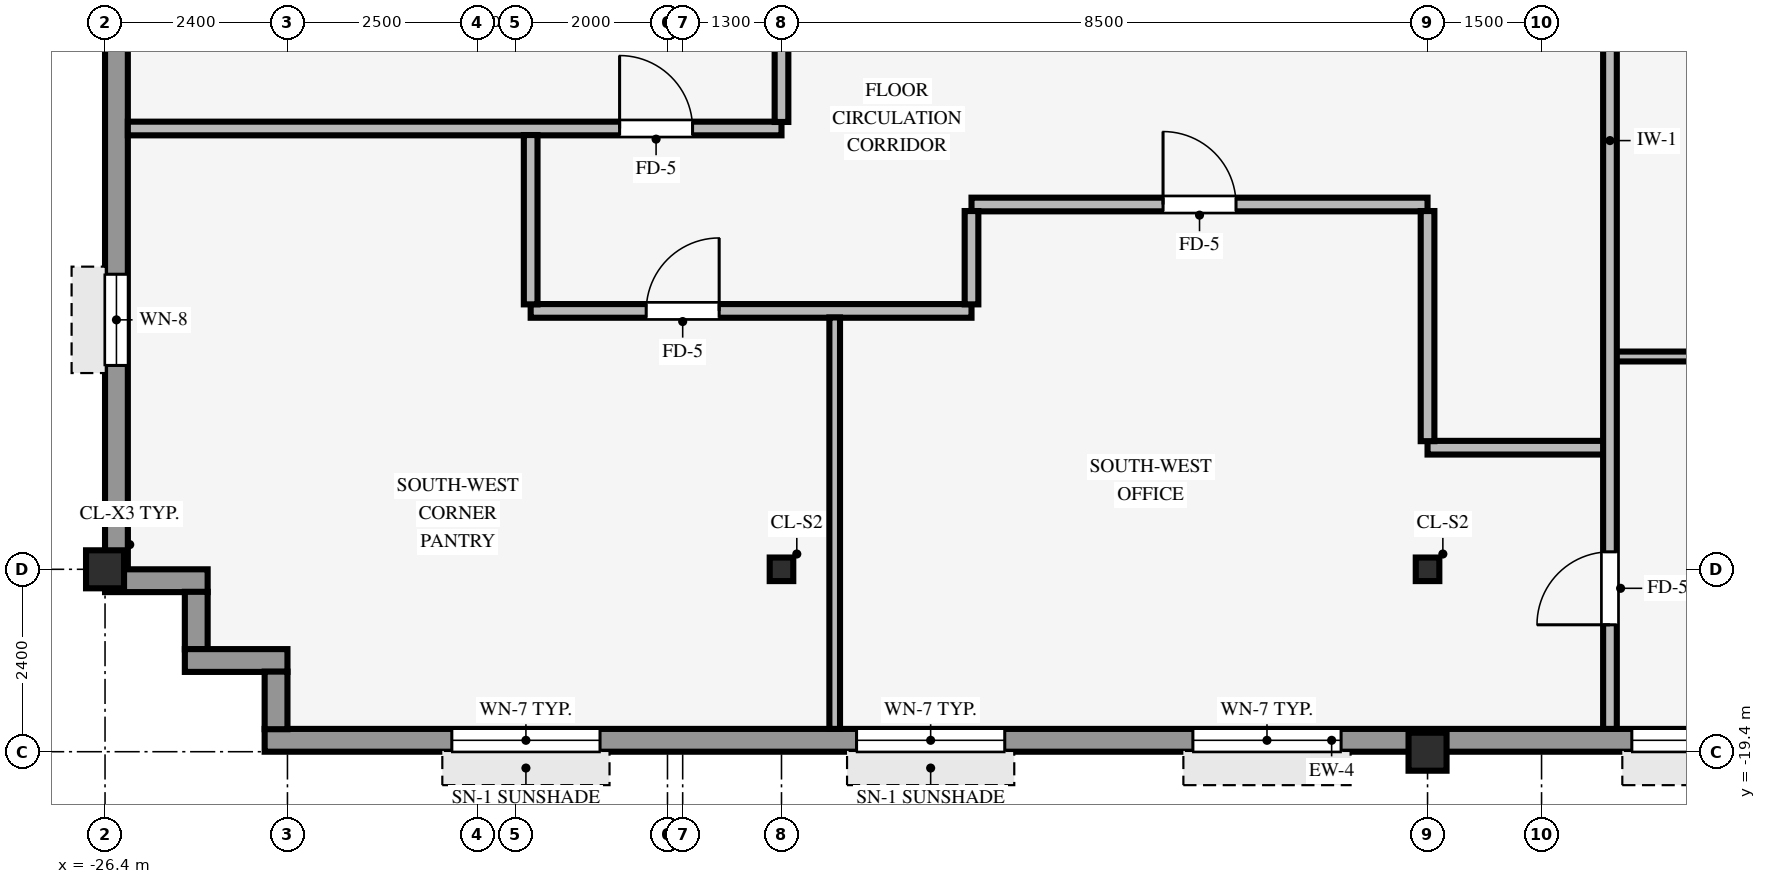
"""IFC4 building model, lengths in metres.
Left out: names, types, materials, properties, quantities, classifications, styles, units other than length and angle.
Written with IfcOpenShell. Run it as: python <this file> out.ifc"""

import sys

from ifc_helpers import new_model, si_unit, direction, frame, frame_2d, origin, origin_2d, place, context, subcontext, project, spatial, rectangle, hollow_rectangle, i_section, extrude, source, transform, mapped, element, fill, save


model = new_model("IFC4")
c1 = context("Model", 3, precision=1e-05, world=origin(), true_north=direction((0.0, 1.0)))
c2 = subcontext(c1, "Body", "Model", "MODEL_VIEW")
j1 = project(units=[si_unit("LENGTHUNIT", "METRE"), si_unit("PLANEANGLEUNIT", "RADIAN")], contexts=[c1])
p1 = place(None, origin())
s1 = spatial("IfcSite", under=j1, at=p1, CompositionType="ELEMENT")
p2 = place(p1, origin())
s2 = spatial("IfcBuilding", under=s1, at=p2, CompositionType="ELEMENT")
p3 = place(p2, frame((0.0, 0.0, 234.7)))
s3 = spatial("IfcBuildingStorey", under=s2, at=p3, CompositionType="ELEMENT", Elevation=234.7)
for number, where, z_axis, x_axis in (
    (1, (-26.4, -17.0, 0.0), (0.0, 0.0, 1.0), (1.0, 0.0, 0.0)),
    (2, (-9.0, -19.4, 0.0), (0.0, 0.0, 1.0), (1.0, 0.0, 0.0)),
):
    element("IfcColumn", number, at=place(p3, frame(where, z_axis=z_axis, x_axis=x_axis)), inside=s3, PredefinedType="COLUMN", context=c2, shape_type="SweptSolid", body=[
        extrude(hollow_rectangle(XDim=0.5, YDim=0.5, WallThickness=0.032, InnerFilletRadius=0.032, OuterFilletRadius=0.064, at=origin_2d()), origin(), (0.0, 0.0, 1.0), 3.37),
    ])
for number, where, z_axis, x_axis in (
    (3, (-17.5, -17.0, 0.0), (0.0, 0.0, 1.0), (1.0, 0.0, 0.0)),
    (4, (-9.0, -17.0, 0.0), (0.0, 0.0, 1.0), (1.0, 0.0, 0.0)),
):
    element("IfcColumn", number, at=place(p3, frame(where, z_axis=z_axis, x_axis=x_axis)), inside=s3, PredefinedType="COLUMN", context=c2, shape_type="SweptSolid", body=[
        extrude(i_section(OverallWidth=0.31, OverallDepth=0.31, WebThickness=0.015, FlangeThickness=0.015, FilletRadius=0.015, at=origin_2d()), origin(), (0.0, 0.0, 1.0), 3.37),
    ])
p4 = place(p3, frame((-24.3, -19.25, 0.0), z_axis=(0.0, 0.0, 1.0), x_axis=(1.0, 0.0, 0.0)))
e5 = element("IfcWall", 5, at=p4, inside=s3, PredefinedType="STANDARD", context=c2, shape_type="SweptSolid", body=[
    extrude(rectangle(XDim=41.0, YDim=0.3, at=frame_2d((20.5, 0.0))), origin(), (0.0, 0.0, 1.0), 2.705),
])
p5 = place(p4, frame((29.55, 0.0, 0.0), z_axis=(0.0, 0.0, 1.0), x_axis=(-1.0, 0.0, 0.0)))
e6 = element("IfcOpeningElement", 6, at=p5, cuts=e5, PredefinedType="OPENING", context=c2, shape_type="SweptSolid", body=[
    extrude(rectangle(XDim=1.05, YDim=2.1, at=frame_2d((0.525, 1.05))), frame((0.0, 0.16, 0.0), z_axis=(0.0, -1.0, 0.0), x_axis=(1.0, 0.0, 0.0)), (0.0, 0.0, 1.0), 0.32),
])
p6 = place(p4, frame((2.462, 0.0, 0.8)))
e7 = element("IfcOpeningElement", 7, at=p6, cuts=e5, PredefinedType="OPENING", context=c2, shape_type="SweptSolid", body=[
    extrude(rectangle(XDim=1.95, YDim=1.48, at=frame_2d((0.975, 0.74))), frame((0.0, 0.16, 0.0), z_axis=(0.0, -1.0, 0.0), x_axis=(1.0, 0.0, 0.0)), (0.0, 0.0, 1.0), 0.32),
])
p7 = place(p4, frame((7.788, 0.0, 0.8)))
e8 = element("IfcOpeningElement", 8, at=p7, cuts=e5, PredefinedType="OPENING", context=c2, shape_type="SweptSolid", body=[
    extrude(rectangle(XDim=1.95, YDim=1.48, at=frame_2d((0.975, 0.74))), frame((0.0, 0.16, 0.0), z_axis=(0.0, -1.0, 0.0), x_axis=(1.0, 0.0, 0.0)), (0.0, 0.0, 1.0), 0.32),
])
p8 = place(p4, frame((12.212, 0.0, 0.8)))
e9 = element("IfcOpeningElement", 9, at=p8, cuts=e5, PredefinedType="OPENING", context=c2, shape_type="SweptSolid", body=[
    extrude(rectangle(XDim=1.95, YDim=1.48, at=frame_2d((0.975, 0.74))), frame((0.0, 0.16, 0.0), z_axis=(0.0, -1.0, 0.0), x_axis=(1.0, 0.0, 0.0)), (0.0, 0.0, 1.0), 0.32),
])
p9 = place(p4, frame((17.988, 0.0, 0.8)))
e10 = element("IfcOpeningElement", 10, at=p9, cuts=e5, PredefinedType="OPENING", context=c2, shape_type="SweptSolid", body=[
    extrude(rectangle(XDim=1.95, YDim=1.48, at=frame_2d((0.975, 0.74))), frame((0.0, 0.16, 0.0), z_axis=(0.0, -1.0, 0.0), x_axis=(1.0, 0.0, 0.0)), (0.0, 0.0, 1.0), 0.32),
])
p10 = place(p4, frame((21.512, 0.0, 0.8)))
e11 = element("IfcOpeningElement", 11, at=p10, cuts=e5, PredefinedType="OPENING", context=c2, shape_type="SweptSolid", body=[
    extrude(rectangle(XDim=1.95, YDim=1.48, at=frame_2d((0.975, 0.74))), frame((0.0, 0.16, 0.0), z_axis=(0.0, -1.0, 0.0), x_axis=(1.0, 0.0, 0.0)), (0.0, 0.0, 1.0), 0.32),
])
p11 = place(p4, frame((25.938, 0.0, 0.8)))
e12 = element("IfcOpeningElement", 12, at=p11, cuts=e5, PredefinedType="OPENING", context=c2, shape_type="SweptSolid", body=[
    extrude(rectangle(XDim=1.95, YDim=1.48, at=frame_2d((0.975, 0.74))), frame((0.0, 0.16, 0.0), z_axis=(0.0, -1.0, 0.0), x_axis=(1.0, 0.0, 0.0)), (0.0, 0.0, 1.0), 0.32),
])
p12 = place(p4, frame((36.587, 0.0, 0.8)))
e13 = element("IfcOpeningElement", 13, at=p12, cuts=e5, PredefinedType="OPENING", context=c2, shape_type="SweptSolid", body=[
    extrude(rectangle(XDim=1.95, YDim=1.48, at=frame_2d((0.975, 0.74))), frame((0.0, 0.16, 0.0), z_axis=(0.0, -1.0, 0.0), x_axis=(1.0, 0.0, 0.0)), (0.0, 0.0, 1.0), 0.32),
])
p13 = place(p3, frame((-26.25, -17.004, 0.0), z_axis=(0.0, 0.0, 1.0), x_axis=(0.0, 1.0, 0.0)))
e14 = element("IfcWall", 14, at=p13, inside=s3, PredefinedType="STANDARD", context=c2, shape_type="SweptSolid", body=[
    extrude(rectangle(XDim=34.008, YDim=0.3, at=frame_2d((17.004, 0.0))), origin(), (0.0, 0.0, 1.0), 2.705),
])
p14 = place(p13, frame((2.686, 0.0, 0.8)))
e15 = element("IfcOpeningElement", 15, at=p14, cuts=e14, PredefinedType="OPENING", context=c2, shape_type="SweptSolid", body=[
    extrude(rectangle(XDim=1.2, YDim=1.48, at=frame_2d((0.6, 0.74))), frame((0.0, 0.16, 0.0), z_axis=(0.0, -1.0, 0.0), x_axis=(1.0, 0.0, 0.0)), (0.0, 0.0, 1.0), 0.32),
])
p15 = place(p13, frame((8.159, 0.0, 0.8)))
e16 = element("IfcOpeningElement", 16, at=p15, cuts=e14, PredefinedType="OPENING", context=c2, shape_type="SweptSolid", body=[
    extrude(rectangle(XDim=1.2, YDim=1.48, at=frame_2d((0.6, 0.74))), frame((0.0, 0.16, 0.0), z_axis=(0.0, -1.0, 0.0), x_axis=(1.0, 0.0, 0.0)), (0.0, 0.0, 1.0), 0.32),
])
p16 = place(p13, frame((11.831, 0.0, 0.8)))
e17 = element("IfcOpeningElement", 17, at=p16, cuts=e14, PredefinedType="OPENING", context=c2, shape_type="SweptSolid", body=[
    extrude(rectangle(XDim=1.2, YDim=1.48, at=frame_2d((0.6, 0.74))), frame((0.0, 0.16, 0.0), z_axis=(0.0, -1.0, 0.0), x_axis=(1.0, 0.0, 0.0)), (0.0, 0.0, 1.0), 0.32),
])
p17 = place(p13, frame((17.754, 0.0, 0.8)))
e18 = element("IfcOpeningElement", 18, at=p17, cuts=e14, PredefinedType="OPENING", context=c2, shape_type="SweptSolid", body=[
    extrude(rectangle(XDim=1.2, YDim=1.48, at=frame_2d((0.6, 0.74))), frame((0.0, 0.16, 0.0), z_axis=(0.0, -1.0, 0.0), x_axis=(1.0, 0.0, 0.0)), (0.0, 0.0, 1.0), 0.32),
])
p18 = place(p13, frame((20.977, 0.0, 0.8)))
e19 = element("IfcOpeningElement", 19, at=p18, cuts=e14, PredefinedType="OPENING", context=c2, shape_type="SweptSolid", body=[
    extrude(rectangle(XDim=1.2, YDim=1.48, at=frame_2d((0.6, 0.74))), frame((0.0, 0.16, 0.0), z_axis=(0.0, -1.0, 0.0), x_axis=(1.0, 0.0, 0.0)), (0.0, 0.0, 1.0), 0.32),
])
p19 = place(p13, frame((24.649, 0.0, 0.8)))
e20 = element("IfcOpeningElement", 20, at=p19, cuts=e14, PredefinedType="OPENING", context=c2, shape_type="SweptSolid", body=[
    extrude(rectangle(XDim=1.2, YDim=1.48, at=frame_2d((0.6, 0.74))), frame((0.0, 0.16, 0.0), z_axis=(0.0, -1.0, 0.0), x_axis=(1.0, 0.0, 0.0)), (0.0, 0.0, 1.0), 0.32),
])
p20 = place(p13, frame((30.122, 0.0, 0.8)))
e21 = element("IfcOpeningElement", 21, at=p20, cuts=e14, PredefinedType="OPENING", context=c2, shape_type="SweptSolid", body=[
    extrude(rectangle(XDim=1.2, YDim=1.48, at=frame_2d((0.6, 0.74))), frame((0.0, 0.16, 0.0), z_axis=(0.0, -1.0, 0.0), x_axis=(1.0, 0.0, 0.0)), (0.0, 0.0, 1.0), 0.32),
])
p21 = place(p3, frame((-26.4, -17.15, 0.0), z_axis=(0.0, 0.0, 1.0), x_axis=(1.0, 0.0, 0.0)))
e22 = element("IfcWall", 22, at=p21, inside=s3, PredefinedType="STANDARD", context=c2, shape_type="SweptSolid", body=[
    extrude(rectangle(XDim=1.35, YDim=0.3, at=frame_2d((0.675, 0.0))), origin(), (0.0, 0.0, 1.0), 2.892),
])
p22 = place(p3, frame((-25.2, -18.054, 0.0), z_axis=(0.0, 0.0, 1.0), x_axis=(0.0, 1.0, 0.0)))
e23 = element("IfcWall", 23, at=p22, inside=s3, PredefinedType="STANDARD", context=c2, shape_type="SweptSolid", body=[
    extrude(rectangle(XDim=0.758, YDim=0.3, at=frame_2d((0.379, 0.0))), origin(), (0.0, 0.0, 1.0), 2.892),
])
p23 = place(p3, frame((-25.35, -18.2, 0.0), z_axis=(0.0, 0.0, 1.0), x_axis=(1.0, 0.0, 0.0)))
e24 = element("IfcWall", 24, at=p23, inside=s3, PredefinedType="STANDARD", context=c2, shape_type="SweptSolid", body=[
    extrude(rectangle(XDim=1.35, YDim=0.3, at=frame_2d((0.675, 0.0))), origin(), (0.0, 0.0, 1.0), 2.892),
])
p24 = place(p3, frame((-24.15, -19.104, 0.0), z_axis=(0.0, 0.0, 1.0), x_axis=(0.0, 1.0, 0.0)))
e25 = element("IfcWall", 25, at=p24, inside=s3, PredefinedType="STANDARD", context=c2, shape_type="SweptSolid", body=[
    extrude(rectangle(XDim=0.758, YDim=0.3, at=frame_2d((0.379, 0.0))), origin(), (0.0, 0.0, 1.0), 2.892),
])
p25 = place(p3, frame((-9.0, -15.4, 0.0), z_axis=(0.0, 0.0, 1.0), x_axis=(1.0, 0.0, 0.0)))
e26 = element("IfcWall", 26, at=p25, inside=s3, PredefinedType="PARTITIONING", context=c2, shape_type="SweptSolid", body=[
    extrude(rectangle(XDim=2.339, YDim=0.18, at=frame_2d((1.169, 0.0))), origin(), (0.0, 0.0, 1.0), 3.36),
])
p26 = place(p3, frame((-6.539, -14.2, 0.0), z_axis=(0.0, 0.0, 1.0), x_axis=(1.0, 0.0, 0.0)))
e27 = element("IfcWall", 27, at=p26, inside=s3, PredefinedType="PARTITIONING", context=c2, shape_type="SweptSolid", body=[
    extrude(rectangle(XDim=13.078, YDim=0.13, at=frame_2d((6.539, 0.0))), origin(), (0.0, 0.0, 1.0), 3.36),
])
p27 = place(p3, frame((-20.8, -13.6, 0.0), z_axis=(0.0, 0.0, 1.0), x_axis=(1.0, 0.0, 0.0)))
e28 = element("IfcWall", 28, at=p27, inside=s3, PredefinedType="PARTITIONING", context=c2, shape_type="SweptSolid", body=[
    extrude(rectangle(XDim=5.8, YDim=0.18, at=frame_2d((2.9, 0.0))), origin(), (0.0, 0.0, 1.0), 3.049),
])
p28 = place(p27, frame((1.52, 0.0, 0.0)))
e29 = element("IfcOpeningElement", 29, at=p28, cuts=e28, PredefinedType="OPENING", context=c2, shape_type="SweptSolid", body=[
    extrude(rectangle(XDim=0.96, YDim=2.1, at=frame_2d((0.48, 1.05))), frame((0.0, 0.1, 0.0), z_axis=(0.0, -1.0, 0.0), x_axis=(1.0, 0.0, 0.0)), (0.0, 0.0, 1.0), 0.2),
])
p29 = place(p3, frame((-15.0, -12.2, 0.0), z_axis=(0.0, 0.0, 1.0), x_axis=(1.0, 0.0, 0.0)))
e30 = element("IfcWall", 30, at=p29, inside=s3, PredefinedType="PARTITIONING", context=c2, shape_type="SweptSolid", body=[
    extrude(rectangle(XDim=6.0, YDim=0.18, at=frame_2d((3.0, 0.0))), origin(), (0.0, 0.0, 1.0), 3.36),
])
p30 = place(p29, frame((2.52, 0.0, 0.0)))
e31 = element("IfcOpeningElement", 31, at=p30, cuts=e30, PredefinedType="OPENING", context=c2, shape_type="SweptSolid", body=[
    extrude(rectangle(XDim=0.96, YDim=2.1, at=frame_2d((0.48, 1.05))), frame((0.0, 0.1, 0.0), z_axis=(0.0, -1.0, 0.0), x_axis=(1.0, 0.0, 0.0)), (0.0, 0.0, 1.0), 0.2),
])
p31 = place(p3, frame((-26.1, -11.2, 0.0), z_axis=(0.0, 0.0, 1.0), x_axis=(1.0, 0.0, 0.0)))
e32 = element("IfcWall", 32, at=p31, inside=s3, PredefinedType="PARTITIONING", context=c2, shape_type="SweptSolid", body=[
    extrude(rectangle(XDim=8.6, YDim=0.18, at=frame_2d((4.3, 0.0))), origin(), (0.0, 0.0, 1.0), 3.36),
])
p32 = place(p31, frame((6.47, 0.0, 0.0)))
e33 = element("IfcOpeningElement", 33, at=p32, cuts=e32, PredefinedType="OPENING", context=c2, shape_type="SweptSolid", body=[
    extrude(rectangle(XDim=0.96, YDim=2.1, at=frame_2d((0.48, 1.05))), frame((0.0, 0.1, 0.0), z_axis=(0.0, -1.0, 0.0), x_axis=(1.0, 0.0, 0.0)), (0.0, 0.0, 1.0), 0.2),
])
p33 = place(p3, frame((-20.8, -13.514, 0.0), z_axis=(0.0, 0.0, 1.0), x_axis=(0.0, 1.0, 0.0)))
e34 = element("IfcWall", 34, at=p33, inside=s3, PredefinedType="PARTITIONING", context=c2, shape_type="SweptSolid", body=[
    extrude(rectangle(XDim=2.228, YDim=0.18, at=frame_2d((1.114, 0.0))), origin(), (0.0, 0.0, 1.0), 3.36),
])
p34 = place(p3, frame((-17.5, -11.114, 0.0), z_axis=(0.0, 0.0, 1.0), x_axis=(0.0, 1.0, 0.0)))
e35 = element("IfcWall", 35, at=p34, inside=s3, PredefinedType="PARTITIONING", context=c2, shape_type="SweptSolid", body=[
    extrude(rectangle(XDim=1.118, YDim=0.18, at=frame_2d((0.559, 0.0))), origin(), (0.0, 0.0, 1.0), 2.892),
])
p35 = place(p3, frame((-16.8, -19.1, 0.0), z_axis=(0.0, 0.0, 1.0), x_axis=(0.0, 1.0, 0.0)))
e36 = element("IfcWall", 36, at=p35, inside=s3, PredefinedType="PARTITIONING", context=c2, shape_type="SweptSolid", body=[
    extrude(rectangle(XDim=5.414, YDim=0.14, at=frame_2d((2.707, 0.0))), origin(), (0.0, 0.0, 1.0), 3.36),
])
p36 = place(p3, frame((-15.0, -13.514, 0.0), z_axis=(0.0, 0.0, 1.0), x_axis=(0.0, 1.0, 0.0)))
e37 = element("IfcWall", 37, at=p36, inside=s3, PredefinedType="PARTITIONING", context=c2, shape_type="SweptSolid", body=[
    extrude(rectangle(XDim=1.228, YDim=0.18, at=frame_2d((0.614, 0.0))), origin(), (0.0, 0.0, 1.0), 3.36),
])
p37 = place(p3, frame((-9.0, -15.314, 0.0), z_axis=(0.0, 0.0, 1.0), x_axis=(0.0, 1.0, 0.0)))
e38 = element("IfcWall", 38, at=p37, inside=s3, PredefinedType="PARTITIONING", context=c2, shape_type="SweptSolid", body=[
    extrude(rectangle(XDim=3.028, YDim=0.18, at=frame_2d((1.514, 0.0))), origin(), (0.0, 0.0, 1.0), 2.892),
])
p38 = place(p3, frame((-6.6, -19.1, 0.0), z_axis=(0.0, 0.0, 1.0), x_axis=(0.0, 1.0, 0.0)))
e39 = element("IfcWall", 39, at=p38, inside=s3, PredefinedType="PARTITIONING", context=c2, shape_type="SweptSolid", body=[
    extrude(rectangle(XDim=17.764, YDim=0.18, at=frame_2d((8.882, 0.0))), origin(), (0.0, 0.0, 1.0), 3.36),
])
p39 = place(p38, frame((13.152, 0.0, 0.0)))
e40 = element("IfcOpeningElement", 40, at=p39, cuts=e39, PredefinedType="OPENING", context=c2, shape_type="SweptSolid", body=[
    extrude(rectangle(XDim=0.96, YDim=2.1, at=frame_2d((0.48, 1.05))), frame((0.0, 0.1, 0.0), z_axis=(0.0, -1.0, 0.0), x_axis=(1.0, 0.0, 0.0)), (0.0, 0.0, 1.0), 0.2),
])
p40 = place(p38, frame((1.37, 0.0, 0.0)))
e41 = element("IfcOpeningElement", 41, at=p40, cuts=e39, PredefinedType="OPENING", context=c2, shape_type="SweptSolid", body=[
    extrude(rectangle(XDim=0.96, YDim=2.1, at=frame_2d((0.48, 1.05))), frame((0.0, 0.1, 0.0), z_axis=(0.0, -1.0, 0.0), x_axis=(1.0, 0.0, 0.0)), (0.0, 0.0, 1.0), 0.2),
])
m1 = source(origin(), c2, "Body", "SweptSolid", [
    extrude(rectangle(XDim=1.95, YDim=1.48, at=frame_2d((0.975, 0.74))), frame((0.0, 0.03, 0.0), z_axis=(0.0, -1.0, 0.0), x_axis=(1.0, 0.0, 0.0)), (0.0, 0.0, 1.0), 0.06),
])
p41 = place(p6, origin())
e42 = element("IfcWindow", 42, at=p41, inside=s3, PartitioningType="SINGLE_PANEL", PredefinedType="WINDOW", context=c2, shape_type="MappedRepresentation", body=[
    mapped(m1, transform((0.0, 0.0, 0.0), scale=1.0)),
])
fill(e7, e42)
p42 = place(p7, origin())
e43 = element("IfcWindow", 43, at=p42, inside=s3, PartitioningType="SINGLE_PANEL", PredefinedType="WINDOW", context=c2, shape_type="MappedRepresentation", body=[
    mapped(m1, transform((0.0, 0.0, 0.0), scale=1.0)),
])
fill(e8, e43)
p43 = place(p8, origin())
e44 = element("IfcWindow", 44, at=p43, inside=s3, PartitioningType="SINGLE_PANEL", PredefinedType="WINDOW", context=c2, shape_type="MappedRepresentation", body=[
    mapped(m1, transform((0.0, 0.0, 0.0), scale=1.0)),
])
fill(e9, e44)
p44 = place(p9, origin())
e45 = element("IfcWindow", 45, at=p44, inside=s3, PartitioningType="SINGLE_PANEL", PredefinedType="WINDOW", context=c2, shape_type="MappedRepresentation", body=[
    mapped(m1, transform((0.0, 0.0, 0.0), scale=1.0)),
])
fill(e10, e45)
m2 = source(origin(), c2, "Body", "SweptSolid", [
    extrude(rectangle(XDim=1.2, YDim=1.48, at=frame_2d((0.6, 0.74))), frame((0.0, 0.03, 0.0), z_axis=(0.0, -1.0, 0.0), x_axis=(1.0, 0.0, 0.0)), (0.0, 0.0, 1.0), 0.06),
])
p45 = place(p14, origin())
e46 = element("IfcWindow", 46, at=p45, inside=s3, PartitioningType="SINGLE_PANEL", PredefinedType="WINDOW", context=c2, shape_type="MappedRepresentation", body=[
    mapped(m2, transform((0.0, 0.0, 0.0), scale=1.0)),
])
fill(e15, e46)
m3 = source(origin(), c2, "Body", "SweptSolid", [
    extrude(rectangle(XDim=0.96, YDim=2.1, at=frame_2d((0.48, 1.05))), frame((0.0, 0.025, 0.0), z_axis=(0.0, -1.0, 0.0), x_axis=(1.0, 0.0, 0.0)), (0.0, 0.0, 1.0), 0.05),
])
p46 = place(p30, origin())
e47 = element("IfcDoor", 47, at=p46, inside=s3, OperationType="SINGLE_SWING_LEFT", PredefinedType="DOOR", context=c2, shape_type="MappedRepresentation", body=[
    mapped(m3, transform((0.0, 0.0, 0.0), scale=1.0)),
])
fill(e31, e47)
p47 = place(p28, origin())
e48 = element("IfcDoor", 48, at=p47, inside=s3, OperationType="SINGLE_SWING_RIGHT", PredefinedType="DOOR", context=c2, shape_type="MappedRepresentation", body=[
    mapped(m3, transform((0.0, 0.0, 0.0), scale=1.0)),
])
fill(e29, e48)
p48 = place(p32, origin())
e49 = element("IfcDoor", 49, at=p48, inside=s3, OperationType="SINGLE_SWING_LEFT", PredefinedType="DOOR", context=c2, shape_type="MappedRepresentation", body=[
    mapped(m3, transform((0.0, 0.0, 0.0), scale=1.0)),
])
fill(e33, e49)
p49 = place(p40, origin())
e50 = element("IfcDoor", 50, at=p49, inside=s3, OperationType="SINGLE_SWING_LEFT", PredefinedType="DOOR", context=c2, shape_type="MappedRepresentation", body=[
    mapped(m3, transform((0.0, 0.0, 0.0), scale=1.0)),
])
fill(e41, e50)
save(model, sys.argv[1])
